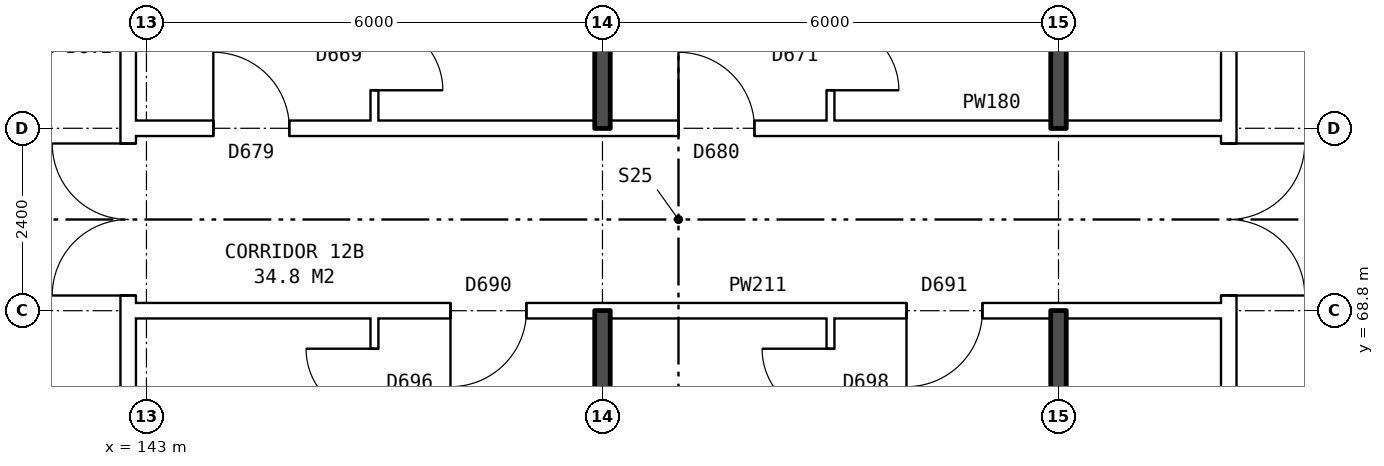
"""IFC4 building model, lengths in metres.
Left out: names, types, materials, properties, quantities, classifications, styles, units other than length and angle.
Written with IfcOpenShell. Run it as: python <this file> out.ifc"""

import sys

from ifc_helpers import new_model, si_unit, direction, frame, frame_2d, origin, place, context, subcontext, project, spatial, rectangle, extrude, element, fill, save


model = new_model("IFC4")
c1 = context("Model", 3, precision=1e-05, world=origin(), true_north=direction((0.0, 1.0)))
c2 = subcontext(c1, "Body", "Model", "MODEL_VIEW")
j1 = project(units=[si_unit("LENGTHUNIT", "METRE"), si_unit("PLANEANGLEUNIT", "RADIAN")], contexts=[c1])
p1 = place(None, origin())
s1 = spatial("IfcSite", under=j1, at=p1, CompositionType="ELEMENT")
p2 = place(p1, origin())
s2 = spatial("IfcBuilding", under=s1, at=p2, CompositionType="ELEMENT")
p3 = place(p2, frame((0.0, 0.0, 47.4)))
s3 = spatial("IfcBuildingStorey", under=s2, at=p3, CompositionType="ELEMENT", Elevation=47.4)
p4 = place(p3, frame((142.76, 63.9, 0.0), z_axis=(0.0, 0.0, 1.0), x_axis=(0.0, 1.0, 0.0)))
e1 = element("IfcWall", 1, at=p4, inside=s3, PredefinedType="PARTITIONING", context=c2, shape_type="SweptSolid", body=[
    extrude(rectangle(XDim=12.2, YDim=0.2, at=frame_2d((6.1, 0.0))), origin(), (0.0, 0.0, 1.0), 2.85),
])
p5 = place(p4, frame((5.1, 0.0, 0.0)))
e2 = element("IfcOpeningElement", 2, at=p5, cuts=e1, PredefinedType="OPENING", context=c2, shape_type="SweptSolid", body=[
    extrude(rectangle(XDim=2.0, YDim=2.1, at=frame_2d((1.0, 1.05))), frame((0.0, 0.11, 0.0), z_axis=(0.0, -1.0, 0.0), x_axis=(1.0, 0.0, 0.0)), (0.0, 0.0, 1.0), 0.22),
])
p6 = place(p3, frame((157.24, 63.9, 0.0), z_axis=(0.0, 0.0, 1.0), x_axis=(0.0, 1.0, 0.0)))
e3 = element("IfcWall", 3, at=p6, inside=s3, PredefinedType="PARTITIONING", context=c2, shape_type="SweptSolid", body=[
    extrude(rectangle(XDim=12.2, YDim=0.2, at=frame_2d((6.1, 0.0))), origin(), (0.0, 0.0, 1.0), 2.85),
])
p7 = place(p6, frame((5.1, 0.0, 0.0)))
e4 = element("IfcOpeningElement", 4, at=p7, cuts=e3, PredefinedType="OPENING", context=c2, shape_type="SweptSolid", body=[
    extrude(rectangle(XDim=2.0, YDim=2.1, at=frame_2d((1.0, 1.05))), frame((0.0, 0.11, 0.0), z_axis=(0.0, -1.0, 0.0), x_axis=(1.0, 0.0, 0.0)), (0.0, 0.0, 1.0), 0.22),
])
p8 = place(p3, frame((142.76, 68.8, 0.0), z_axis=(0.0, 0.0, 1.0), x_axis=(1.0, 0.0, 0.0)))
e5 = element("IfcWall", 5, at=p8, inside=s3, PredefinedType="PARTITIONING", context=c2, shape_type="SweptSolid", body=[
    extrude(rectangle(XDim=14.48, YDim=0.2, at=frame_2d((7.24, 0.0))), origin(), (0.0, 0.0, 1.0), 2.85),
])
p9 = place(p8, frame((4.24, 0.0, 0.0)))
e6 = element("IfcOpeningElement", 6, at=p9, cuts=e5, PredefinedType="OPENING", context=c2, shape_type="SweptSolid", body=[
    extrude(rectangle(XDim=1.0, YDim=2.1, at=frame_2d((0.5, 1.05))), frame((0.0, 0.11, 0.0), z_axis=(0.0, -1.0, 0.0), x_axis=(1.0, 0.0, 0.0)), (0.0, 0.0, 1.0), 0.22),
])
p10 = place(p8, frame((10.24, 0.0, 0.0)))
e7 = element("IfcOpeningElement", 7, at=p10, cuts=e5, PredefinedType="OPENING", context=c2, shape_type="SweptSolid", body=[
    extrude(rectangle(XDim=1.0, YDim=2.1, at=frame_2d((0.5, 1.05))), frame((0.0, 0.11, 0.0), z_axis=(0.0, -1.0, 0.0), x_axis=(1.0, 0.0, 0.0)), (0.0, 0.0, 1.0), 0.22),
])
p11 = place(p3, frame((142.76, 71.2, 0.0), z_axis=(0.0, 0.0, 1.0), x_axis=(1.0, 0.0, 0.0)))
e8 = element("IfcWall", 8, at=p11, inside=s3, PredefinedType="PARTITIONING", context=c2, shape_type="SweptSolid", body=[
    extrude(rectangle(XDim=14.48, YDim=0.2, at=frame_2d((7.24, 0.0))), origin(), (0.0, 0.0, 1.0), 2.85),
])
p12 = place(p11, frame((1.12, 0.0, 0.0)))
e9 = element("IfcOpeningElement", 9, at=p12, cuts=e8, PredefinedType="OPENING", context=c2, shape_type="SweptSolid", body=[
    extrude(rectangle(XDim=1.0, YDim=2.1, at=frame_2d((0.5, 1.05))), frame((0.0, 0.11, 0.0), z_axis=(0.0, -1.0, 0.0), x_axis=(1.0, 0.0, 0.0)), (0.0, 0.0, 1.0), 0.22),
])
p13 = place(p11, frame((7.24, 0.0, 0.0)))
e10 = element("IfcOpeningElement", 10, at=p13, cuts=e8, PredefinedType="OPENING", context=c2, shape_type="SweptSolid", body=[
    extrude(rectangle(XDim=1.0, YDim=2.1, at=frame_2d((0.5, 1.05))), frame((0.0, 0.11, 0.0), z_axis=(0.0, -1.0, 0.0), x_axis=(1.0, 0.0, 0.0)), (0.0, 0.0, 1.0), 0.22),
])
p14 = place(p3, frame((146.0, 54.36, 0.0), z_axis=(0.0, 0.0, 1.0), x_axis=(0.0, 1.0, 0.0)))
e11 = element("IfcWall", 11, at=p14, inside=s3, PredefinedType="PARTITIONING", context=c2, shape_type="SweptSolid", body=[
    extrude(rectangle(XDim=14.34, YDim=0.1, at=frame_2d((7.17, 0.0))), origin(), (0.0, 0.0, 1.0), 2.85),
])
p15 = place(p14, frame((5.5, 0.0, 0.0)))
e12 = element("IfcOpeningElement", 12, at=p15, cuts=e11, PredefinedType="OPENING", context=c2, shape_type="SweptSolid", body=[
    extrude(rectangle(XDim=0.9, YDim=2.1, at=frame_2d((0.45, 1.05))), frame((0.0, 0.06, 0.0), z_axis=(0.0, -1.0, 0.0), x_axis=(1.0, 0.0, 0.0)), (0.0, 0.0, 1.0), 0.12),
])
p16 = place(p14, frame((13.04, 0.0, 0.0)))
e13 = element("IfcOpeningElement", 13, at=p16, cuts=e11, PredefinedType="OPENING", context=c2, shape_type="SweptSolid", body=[
    extrude(rectangle(XDim=0.9, YDim=2.1, at=frame_2d((0.45, 1.05))), frame((0.0, 0.06, 0.0), z_axis=(0.0, -1.0, 0.0), x_axis=(1.0, 0.0, 0.0)), (0.0, 0.0, 1.0), 0.12),
])
p17 = place(p3, frame((146.0, 71.3, 0.0), z_axis=(0.0, 0.0, 1.0), x_axis=(0.0, 1.0, 0.0)))
e14 = element("IfcWall", 14, at=p17, inside=s3, PredefinedType="PARTITIONING", context=c2, shape_type="SweptSolid", body=[
    extrude(rectangle(XDim=14.34, YDim=0.1, at=frame_2d((7.17, 0.0))), origin(), (0.0, 0.0, 1.0), 2.85),
])
p18 = place(p17, frame((7.94, 0.0, 0.0)))
e15 = element("IfcOpeningElement", 15, at=p18, cuts=e14, PredefinedType="OPENING", context=c2, shape_type="SweptSolid", body=[
    extrude(rectangle(XDim=0.9, YDim=2.1, at=frame_2d((0.45, 1.05))), frame((0.0, 0.06, 0.0), z_axis=(0.0, -1.0, 0.0), x_axis=(1.0, 0.0, 0.0)), (0.0, 0.0, 1.0), 0.12),
])
p19 = place(p17, frame((0.4, 0.0, 0.0)))
e16 = element("IfcOpeningElement", 16, at=p19, cuts=e14, PredefinedType="OPENING", context=c2, shape_type="SweptSolid", body=[
    extrude(rectangle(XDim=0.9, YDim=2.1, at=frame_2d((0.45, 1.05))), frame((0.0, 0.06, 0.0), z_axis=(0.0, -1.0, 0.0), x_axis=(1.0, 0.0, 0.0)), (0.0, 0.0, 1.0), 0.12),
])
for number, where, z_axis, x_axis in (
    (17, (149.0, 54.36, 0.0), (0.0, 0.0, 1.0), (0.0, 1.0, 0.0)),
    (18, (149.0, 71.2, 0.0), (0.0, 0.0, 1.0), (0.0, 1.0, 0.0)),
):
    element("IfcWall", number, at=place(p3, frame(where, z_axis=z_axis, x_axis=x_axis)), inside=s3, PredefinedType="SOLIDWALL", context=c2, shape_type="SweptSolid", body=[
        extrude(rectangle(XDim=14.44, YDim=0.2, at=frame_2d((7.22, 0.0))), origin(), (0.0, 0.0, 1.0), 2.85),
    ])
p20 = place(p3, frame((152.0, 54.36, 0.0), z_axis=(0.0, 0.0, 1.0), x_axis=(0.0, 1.0, 0.0)))
e19 = element("IfcWall", 19, at=p20, inside=s3, PredefinedType="PARTITIONING", context=c2, shape_type="SweptSolid", body=[
    extrude(rectangle(XDim=14.34, YDim=0.1, at=frame_2d((7.17, 0.0))), origin(), (0.0, 0.0, 1.0), 2.85),
])
p21 = place(p20, frame((4.2, 0.0, 0.0)))
e20 = element("IfcOpeningElement", 20, at=p21, cuts=e19, PredefinedType="OPENING", context=c2, shape_type="SweptSolid", body=[
    extrude(rectangle(XDim=0.9, YDim=2.1, at=frame_2d((0.45, 1.05))), frame((0.0, 0.06, 0.0), z_axis=(0.0, -1.0, 0.0), x_axis=(1.0, 0.0, 0.0)), (0.0, 0.0, 1.0), 0.12),
])
p22 = place(p20, frame((13.04, 0.0, 0.0)))
e21 = element("IfcOpeningElement", 21, at=p22, cuts=e19, PredefinedType="OPENING", context=c2, shape_type="SweptSolid", body=[
    extrude(rectangle(XDim=0.9, YDim=2.1, at=frame_2d((0.45, 1.05))), frame((0.0, 0.06, 0.0), z_axis=(0.0, -1.0, 0.0), x_axis=(1.0, 0.0, 0.0)), (0.0, 0.0, 1.0), 0.12),
])
p23 = place(p3, frame((152.0, 71.3, 0.0), z_axis=(0.0, 0.0, 1.0), x_axis=(0.0, 1.0, 0.0)))
e22 = element("IfcWall", 22, at=p23, inside=s3, PredefinedType="PARTITIONING", context=c2, shape_type="SweptSolid", body=[
    extrude(rectangle(XDim=14.34, YDim=0.1, at=frame_2d((7.17, 0.0))), origin(), (0.0, 0.0, 1.0), 2.85),
])
p24 = place(p23, frame((5.74, 0.0, 0.0)))
e23 = element("IfcOpeningElement", 23, at=p24, cuts=e22, PredefinedType="OPENING", context=c2, shape_type="SweptSolid", body=[
    extrude(rectangle(XDim=0.9, YDim=2.1, at=frame_2d((0.45, 1.05))), frame((0.0, 0.06, 0.0), z_axis=(0.0, -1.0, 0.0), x_axis=(1.0, 0.0, 0.0)), (0.0, 0.0, 1.0), 0.12),
])
p25 = place(p23, frame((0.4, 0.0, 0.0)))
e24 = element("IfcOpeningElement", 24, at=p25, cuts=e22, PredefinedType="OPENING", context=c2, shape_type="SweptSolid", body=[
    extrude(rectangle(XDim=0.9, YDim=2.1, at=frame_2d((0.45, 1.05))), frame((0.0, 0.06, 0.0), z_axis=(0.0, -1.0, 0.0), x_axis=(1.0, 0.0, 0.0)), (0.0, 0.0, 1.0), 0.12),
])
for number, where, z_axis, x_axis in (
    (25, (155.0, 63.8, 0.0), (0.0, 0.0, 1.0), (0.0, 1.0, 0.0)),
    (26, (155.0, 71.2, 0.0), (0.0, 0.0, 1.0), (0.0, 1.0, 0.0)),
):
    element("IfcWall", number, at=place(p3, frame(where, z_axis=z_axis, x_axis=x_axis)), inside=s3, PredefinedType="SOLIDWALL", context=c2, shape_type="SweptSolid", body=[
        extrude(rectangle(XDim=5.0, YDim=0.2, at=frame_2d((2.5, 0.0))), origin(), (0.0, 0.0, 1.0), 2.85),
    ])
p26 = place(p5, origin())
e27 = element("IfcDoor", 27, at=p26, inside=s3, OperationType="DOUBLE_DOOR_SINGLE_SWING", PredefinedType="DOOR", context=c2, shape_type="SweptSolid", body=[
    extrude(rectangle(XDim=2.0, YDim=2.1, at=frame_2d((1.0, 1.05))), frame((0.0, 0.025, 0.0), z_axis=(0.0, -1.0, 0.0), x_axis=(1.0, 0.0, 0.0)), (0.0, 0.0, 1.0), 0.05),
])
fill(e2, e27)
p27 = place(p7, frame((2.0, 0.0, 0.0), z_axis=(0.0, 0.0, 1.0), x_axis=(-1.0, 0.0, 0.0)))
e28 = element("IfcDoor", 28, at=p27, inside=s3, OperationType="DOUBLE_DOOR_SINGLE_SWING", PredefinedType="DOOR", context=c2, shape_type="SweptSolid", body=[
    extrude(rectangle(XDim=2.0, YDim=2.1, at=frame_2d((1.0, 1.05))), frame((0.0, 0.025, 0.0), z_axis=(0.0, -1.0, 0.0), x_axis=(1.0, 0.0, 0.0)), (0.0, 0.0, 1.0), 0.05),
])
fill(e4, e28)
p28 = place(p9, frame((1.0, 0.0, 0.0), z_axis=(0.0, 0.0, 1.0), x_axis=(-1.0, 0.0, 0.0)))
e29 = element("IfcDoor", 29, at=p28, inside=s3, OperationType="SINGLE_SWING_RIGHT", PredefinedType="DOOR", context=c2, shape_type="SweptSolid", body=[
    extrude(rectangle(XDim=1.0, YDim=2.1, at=frame_2d((0.5, 1.05))), frame((0.0, 0.025, 0.0), z_axis=(0.0, -1.0, 0.0), x_axis=(1.0, 0.0, 0.0)), (0.0, 0.0, 1.0), 0.05),
])
fill(e6, e29)
p29 = place(p16, origin())
e30 = element("IfcDoor", 30, at=p29, inside=s3, OperationType="SINGLE_SWING_RIGHT", PredefinedType="DOOR", context=c2, shape_type="SweptSolid", body=[
    extrude(rectangle(XDim=0.9, YDim=2.1, at=frame_2d((0.45, 1.05))), frame((0.0, 0.025, 0.0), z_axis=(0.0, -1.0, 0.0), x_axis=(1.0, 0.0, 0.0)), (0.0, 0.0, 1.0), 0.05),
])
fill(e13, e30)
p30 = place(p10, frame((1.0, 0.0, 0.0), z_axis=(0.0, 0.0, 1.0), x_axis=(-1.0, 0.0, 0.0)))
e31 = element("IfcDoor", 31, at=p30, inside=s3, OperationType="SINGLE_SWING_RIGHT", PredefinedType="DOOR", context=c2, shape_type="SweptSolid", body=[
    extrude(rectangle(XDim=1.0, YDim=2.1, at=frame_2d((0.5, 1.05))), frame((0.0, 0.025, 0.0), z_axis=(0.0, -1.0, 0.0), x_axis=(1.0, 0.0, 0.0)), (0.0, 0.0, 1.0), 0.05),
])
fill(e7, e31)
p31 = place(p22, origin())
e32 = element("IfcDoor", 32, at=p31, inside=s3, OperationType="SINGLE_SWING_RIGHT", PredefinedType="DOOR", context=c2, shape_type="SweptSolid", body=[
    extrude(rectangle(XDim=0.9, YDim=2.1, at=frame_2d((0.45, 1.05))), frame((0.0, 0.025, 0.0), z_axis=(0.0, -1.0, 0.0), x_axis=(1.0, 0.0, 0.0)), (0.0, 0.0, 1.0), 0.05),
])
fill(e21, e32)
p32 = place(p12, origin())
e33 = element("IfcDoor", 33, at=p32, inside=s3, OperationType="SINGLE_SWING_LEFT", PredefinedType="DOOR", context=c2, shape_type="SweptSolid", body=[
    extrude(rectangle(XDim=1.0, YDim=2.1, at=frame_2d((0.5, 1.05))), frame((0.0, 0.025, 0.0), z_axis=(0.0, -1.0, 0.0), x_axis=(1.0, 0.0, 0.0)), (0.0, 0.0, 1.0), 0.05),
])
fill(e9, e33)
p33 = place(p19, frame((0.9, 0.0, 0.0), z_axis=(0.0, 0.0, 1.0), x_axis=(-1.0, 0.0, 0.0)))
e34 = element("IfcDoor", 34, at=p33, inside=s3, OperationType="SINGLE_SWING_RIGHT", PredefinedType="DOOR", context=c2, shape_type="SweptSolid", body=[
    extrude(rectangle(XDim=0.9, YDim=2.1, at=frame_2d((0.45, 1.05))), frame((0.0, 0.025, 0.0), z_axis=(0.0, -1.0, 0.0), x_axis=(1.0, 0.0, 0.0)), (0.0, 0.0, 1.0), 0.05),
])
fill(e16, e34)
p34 = place(p13, origin())
e35 = element("IfcDoor", 35, at=p34, inside=s3, OperationType="SINGLE_SWING_LEFT", PredefinedType="DOOR", context=c2, shape_type="SweptSolid", body=[
    extrude(rectangle(XDim=1.0, YDim=2.1, at=frame_2d((0.5, 1.05))), frame((0.0, 0.025, 0.0), z_axis=(0.0, -1.0, 0.0), x_axis=(1.0, 0.0, 0.0)), (0.0, 0.0, 1.0), 0.05),
])
fill(e10, e35)
p35 = place(p25, frame((0.9, 0.0, 0.0), z_axis=(0.0, 0.0, 1.0), x_axis=(-1.0, 0.0, 0.0)))
e36 = element("IfcDoor", 36, at=p35, inside=s3, OperationType="SINGLE_SWING_RIGHT", PredefinedType="DOOR", context=c2, shape_type="SweptSolid", body=[
    extrude(rectangle(XDim=0.9, YDim=2.1, at=frame_2d((0.45, 1.05))), frame((0.0, 0.025, 0.0), z_axis=(0.0, -1.0, 0.0), x_axis=(1.0, 0.0, 0.0)), (0.0, 0.0, 1.0), 0.05),
])
fill(e24, e36)
save(model, sys.argv[1])
